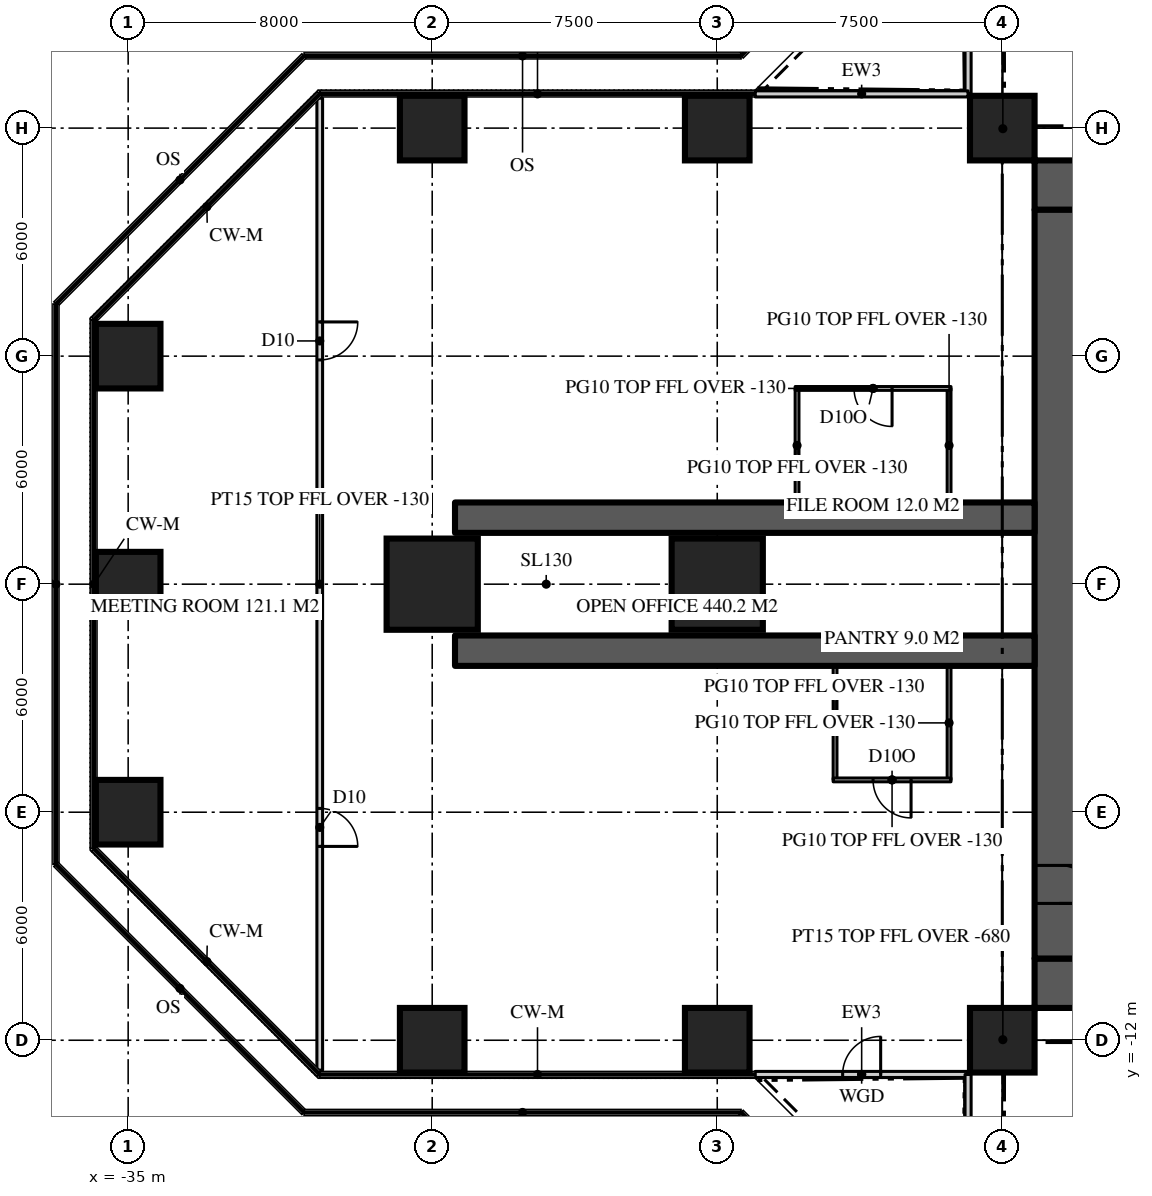
"""IFC4 building model, lengths in metres.
Left out: names, types, materials, properties, quantities, classifications, styles, units other than length and angle.
Written with IfcOpenShell. Run it as: python <this file> out.ifc"""

import sys

from ifc_helpers import new_model, si_unit, direction, frame, frame_2d, origin, origin_2d, place, context, subcontext, project, spatial, rectangle, extrude, element, fill, save


model = new_model("IFC4")
c1 = context("Model", 3, precision=1e-05, world=origin(), true_north=direction((0.0, 1.0)))
c2 = subcontext(c1, "Body", "Model", "MODEL_VIEW")
j1 = project(units=[si_unit("LENGTHUNIT", "METRE"), si_unit("PLANEANGLEUNIT", "RADIAN")], contexts=[c1])
p1 = place(None, origin())
s1 = spatial("IfcSite", under=j1, at=p1, CompositionType="ELEMENT")
p2 = place(p1, origin())
s2 = spatial("IfcBuilding", under=s1, at=p2, CompositionType="ELEMENT")
p3 = place(p2, frame((0.0, 0.0, 128.1)))
s3 = spatial("IfcBuildingStorey", under=s2, at=p3, CompositionType="ELEMENT", Elevation=128.1)
p4 = place(p3, frame((-11.15, 10.5, 0.0), z_axis=(0.0, 0.0, 1.0), x_axis=(1.0, 0.0, 0.0)))
e1 = element("IfcWall", 1, at=p4, inside=s3, PredefinedType="SHEAR", context=c2, shape_type="SweptSolid", body=[
    extrude(rectangle(XDim=22.3, YDim=1.3, at=frame_2d((11.15, 0.0))), origin(), (0.0, 0.0, 1.0), 3.9),
])
p5 = place(p4, frame((4.25, 0.0, 0.0)))
e2 = element("IfcOpeningElement", 2, at=p5, cuts=e1, PredefinedType="OPENING", context=c2, shape_type="SweptSolid", body=[
    extrude(rectangle(XDim=1.8, YDim=2.2, at=frame_2d((0.9, 1.1))), frame((0.0, 0.66, 0.0), z_axis=(0.0, -1.0, 0.0), x_axis=(1.0, 0.0, 0.0)), (0.0, 0.0, 1.0), 1.32),
])
p6 = place(p4, frame((16.25, 0.0, 0.0)))
e3 = element("IfcOpeningElement", 3, at=p6, cuts=e1, PredefinedType="OPENING", context=c2, shape_type="SweptSolid", body=[
    extrude(rectangle(XDim=1.8, YDim=2.2, at=frame_2d((0.9, 1.1))), frame((0.0, 0.66, 0.0), z_axis=(0.0, -1.0, 0.0), x_axis=(1.0, 0.0, 0.0)), (0.0, 0.0, 1.0), 1.32),
])
p7 = place(p3, frame((11.15, -10.5, 0.0), z_axis=(0.0, 0.0, 1.0), x_axis=(-1.0, 0.0, 0.0)))
e4 = element("IfcWall", 4, at=p7, inside=s3, PredefinedType="SHEAR", context=c2, shape_type="SweptSolid", body=[
    extrude(rectangle(XDim=22.3, YDim=1.3, at=frame_2d((11.15, 0.0))), origin(), (0.0, 0.0, 1.0), 3.9),
])
p8 = place(p7, frame((16.25, 0.0, 0.0)))
e5 = element("IfcOpeningElement", 5, at=p8, cuts=e4, PredefinedType="OPENING", context=c2, shape_type="SweptSolid", body=[
    extrude(rectangle(XDim=1.8, YDim=2.2, at=frame_2d((0.9, 1.1))), frame((0.0, 0.66, 0.0), z_axis=(0.0, -1.0, 0.0), x_axis=(1.0, 0.0, 0.0)), (0.0, 0.0, 1.0), 1.32),
])
p9 = place(p7, frame((4.25, 0.0, 0.0)))
e6 = element("IfcOpeningElement", 6, at=p9, cuts=e4, PredefinedType="OPENING", context=c2, shape_type="SweptSolid", body=[
    extrude(rectangle(XDim=1.8, YDim=2.2, at=frame_2d((0.9, 1.1))), frame((0.0, 0.66, 0.0), z_axis=(0.0, -1.0, 0.0), x_axis=(1.0, 0.0, 0.0)), (0.0, 0.0, 1.0), 1.32),
])
p10 = place(p3, frame((-10.5, 9.85, 0.0), z_axis=(0.0, 0.0, 1.0), x_axis=(0.0, -1.0, 0.0)))
e7 = element("IfcWall", 7, at=p10, inside=s3, PredefinedType="SHEAR", context=c2, shape_type="SweptSolid", body=[
    extrude(rectangle(XDim=19.7, YDim=1.3, at=frame_2d((9.85, 0.0))), origin(), (0.0, 0.0, 1.0), 3.9),
])
p11 = place(p10, frame((17.25, 0.0, 0.0)))
e8 = element("IfcOpeningElement", 8, at=p11, cuts=e7, PredefinedType="OPENING", context=c2, shape_type="SweptSolid", body=[
    extrude(rectangle(XDim=1.0, YDim=2.2, at=frame_2d((0.5, 1.1))), frame((0.0, 0.66, 0.0), z_axis=(0.0, -1.0, 0.0), x_axis=(1.0, 0.0, 0.0)), (0.0, 0.0, 1.0), 1.32),
])
for number, where, z_axis, x_axis in (
    (9, (-11.15, 1.75, 0.0), (0.0, 0.0, 1.0), (-1.0, 0.0, 0.0)),
    (10, (-11.15, -1.75, 0.0), (0.0, 0.0, 1.0), (-1.0, 0.0, 0.0)),
):
    element("IfcWall", number, at=place(p3, frame(where, z_axis=z_axis, x_axis=x_axis)), inside=s3, PredefinedType="SHEAR", context=c2, shape_type="SweptSolid", body=[
        extrude(rectangle(XDim=15.25, YDim=0.8, at=frame_2d((7.625, 0.0))), origin(), (0.0, 0.0, 1.0), 3.9),
    ])
for number, where, z_axis, x_axis in (
    (11, (-27.0, -12.0, 0.0), (0.0, 0.0, 1.0), (1.0, 0.0, 0.0)),
    (12, (-19.5, -12.0, 0.0), (0.0, 0.0, 1.0), (1.0, 0.0, 0.0)),
    (13, (-12.0, -12.0, 0.0), (0.0, 0.0, 1.0), (1.0, 0.0, 0.0)),
    (14, (-35.0, -6.0, 0.0), (0.0, 0.0, 1.0), (1.0, 0.0, 0.0)),
    (15, (-35.0, 0.0, 0.0), (0.0, 0.0, 1.0), (1.0, 0.0, 0.0)),
):
    element("IfcColumn", number, at=place(p3, frame(where, z_axis=z_axis, x_axis=x_axis)), inside=s3, PredefinedType="COLUMN", context=c2, shape_type="SweptSolid", body=[
        extrude(rectangle(XDim=1.7, YDim=1.7, at=origin_2d()), origin(), (0.0, 0.0, 1.0), 3.9),
    ])
for number, where, z_axis, x_axis in (
    (16, (-27.0, 0.0, 0.0), (0.0, 0.0, 1.0), (1.0, 0.0, 0.0)),
    (17, (-19.5, 0.0, 0.0), (0.0, 0.0, 1.0), (1.0, 0.0, 0.0)),
):
    element("IfcColumn", number, at=place(p3, frame(where, z_axis=z_axis, x_axis=x_axis)), inside=s3, PredefinedType="COLUMN", context=c2, shape_type="SweptSolid", body=[
        extrude(rectangle(XDim=2.4, YDim=2.4, at=origin_2d()), origin(), (0.0, 0.0, 1.0), 3.9),
    ])
for number, where, z_axis, x_axis in (
    (18, (-35.0, 6.0, 0.0), (0.0, 0.0, 1.0), (1.0, 0.0, 0.0)),
    (19, (-27.0, 12.0, 0.0), (0.0, 0.0, 1.0), (1.0, 0.0, 0.0)),
    (20, (-19.5, 12.0, 0.0), (0.0, 0.0, 1.0), (1.0, 0.0, 0.0)),
    (21, (-12.0, 12.0, 0.0), (0.0, 0.0, 1.0), (1.0, 0.0, 0.0)),
):
    element("IfcColumn", number, at=place(p3, frame(where, z_axis=z_axis, x_axis=x_axis)), inside=s3, PredefinedType="COLUMN", context=c2, shape_type="SweptSolid", body=[
        extrude(rectangle(XDim=1.7, YDim=1.7, at=origin_2d()), origin(), (0.0, 0.0, 1.0), 3.9),
    ])
p12 = place(p3, frame((-12.9, 18.5, 0.0), z_axis=(0.0, 0.0, 1.0), x_axis=(0.0, -1.0, 0.0)))
e22 = element("IfcWall", 22, at=p12, inside=s3, PredefinedType="SOLIDWALL", context=c2, shape_type="SweptSolid", body=[
    extrude(rectangle(XDim=5.6, YDim=0.16, at=frame_2d((2.8, 0.0))), origin(), (0.0, 0.0, 1.0), 3.77),
])
p13 = place(p12, frame((2.3, 0.0, 0.0)))
e23 = element("IfcOpeningElement", 23, at=p13, cuts=e22, PredefinedType="OPENING", context=c2, shape_type="SweptSolid", body=[
    extrude(rectangle(XDim=1.0, YDim=2.2, at=frame_2d((0.5, 1.1))), frame((0.0, 0.09, 0.0), z_axis=(0.0, -1.0, 0.0), x_axis=(1.0, 0.0, 0.0)), (0.0, 0.0, 1.0), 0.18),
])
p14 = place(p3, frame((-12.9, 12.9, 0.0), z_axis=(0.0, 0.0, 1.0), x_axis=(-1.0, 0.0, 0.0)))
e24 = element("IfcWall", 24, at=p14, inside=s3, PredefinedType="SOLIDWALL", context=c2, shape_type="SweptSolid", body=[
    extrude(rectangle(XDim=5.6, YDim=0.16, at=frame_2d((2.8, 0.0))), origin(), (0.0, 0.0, 1.0), 3.77),
])
p15 = place(p3, frame((-18.5, -12.9, 0.0), z_axis=(0.0, 0.0, 1.0), x_axis=(1.0, 0.0, 0.0)))
e25 = element("IfcWall", 25, at=p15, inside=s3, PredefinedType="SOLIDWALL", context=c2, shape_type="SweptSolid", body=[
    extrude(rectangle(XDim=5.6, YDim=0.16, at=frame_2d((2.8, 0.0))), origin(), (0.0, 0.0, 1.0), 3.77),
])
p16 = place(p15, frame((2.3, 0.0, 0.0)))
e26 = element("IfcOpeningElement", 26, at=p16, cuts=e25, PredefinedType="OPENING", context=c2, shape_type="SweptSolid", body=[
    extrude(rectangle(XDim=1.0, YDim=2.2, at=frame_2d((0.5, 1.1))), frame((0.0, 0.09, 0.0), z_axis=(0.0, -1.0, 0.0), x_axis=(1.0, 0.0, 0.0)), (0.0, 0.0, 1.0), 0.18),
])
p17 = place(p3, frame((-12.9, -12.9, 0.0), z_axis=(0.0, 0.0, 1.0), x_axis=(0.0, -1.0, 0.0)))
e27 = element("IfcWall", 27, at=p17, inside=s3, PredefinedType="SOLIDWALL", context=c2, shape_type="SweptSolid", body=[
    extrude(rectangle(XDim=5.6, YDim=0.16, at=frame_2d((2.8, 0.0))), origin(), (0.0, 0.0, 1.0), 3.77),
])
p18 = place(p3, frame((-29.959, 12.786, 0.0), z_axis=(0.0, 0.0, 1.0), x_axis=(0.0, -1.0, 0.0)))
e28 = element("IfcWall", 28, at=p18, inside=s3, PredefinedType="PARTITIONING", context=c2, shape_type="SweptSolid", body=[
    extrude(rectangle(XDim=25.573, YDim=0.15, at=frame_2d((12.786, 0.0))), origin(), (0.0, 0.0, 1.0), 3.77),
])
p19 = place(p18, frame((18.687, 0.0, 0.0)))
e29 = element("IfcOpeningElement", 29, at=p19, cuts=e28, PredefinedType="OPENING", context=c2, shape_type="SweptSolid", body=[
    extrude(rectangle(XDim=1.0, YDim=2.2, at=frame_2d((0.5, 1.1))), frame((0.0, 0.085, 0.0), z_axis=(0.0, -1.0, 0.0), x_axis=(1.0, 0.0, 0.0)), (0.0, 0.0, 1.0), 0.17),
])
p20 = place(p18, frame((5.886, 0.0, 0.0)))
e30 = element("IfcOpeningElement", 30, at=p20, cuts=e28, PredefinedType="OPENING", context=c2, shape_type="SweptSolid", body=[
    extrude(rectangle(XDim=1.0, YDim=2.2, at=frame_2d((0.5, 1.1))), frame((0.0, 0.085, 0.0), z_axis=(0.0, -1.0, 0.0), x_axis=(1.0, 0.0, 0.0)), (0.0, 0.0, 1.0), 0.17),
])
for number, where, z_axis, x_axis in (
    (31, (-13.4, -2.15, 0.0), (0.0, 0.0, 1.0), (0.0, -1.0, 0.0)),
    (32, (-16.4, -2.15, 0.0), (0.0, 0.0, 1.0), (0.0, -1.0, 0.0)),
):
    element("IfcWall", number, at=place(p3, frame(where, z_axis=z_axis, x_axis=x_axis)), inside=s3, PredefinedType="PARTITIONING", context=c2, shape_type="SweptSolid", body=[
        extrude(rectangle(XDim=3.0, YDim=0.1, at=frame_2d((1.5, 0.0))), origin(), (0.0, 0.0, 1.0), 3.77),
    ])
p21 = place(p3, frame((-13.35, -5.15, 0.0), z_axis=(0.0, 0.0, 1.0), x_axis=(-1.0, 0.0, 0.0)))
e33 = element("IfcWall", 33, at=p21, inside=s3, PredefinedType="PARTITIONING", context=c2, shape_type="SweptSolid", body=[
    extrude(rectangle(XDim=3.1, YDim=0.1, at=frame_2d((1.55, 0.0))), origin(), (0.0, 0.0, 1.0), 3.77),
])
p22 = place(p21, frame((1.05, 0.0, 0.0)))
e34 = element("IfcOpeningElement", 34, at=p22, cuts=e33, PredefinedType="OPENING", context=c2, shape_type="SweptSolid", body=[
    extrude(rectangle(XDim=1.0, YDim=2.2, at=frame_2d((0.5, 1.1))), frame((0.0, 0.06, 0.0), z_axis=(0.0, -1.0, 0.0), x_axis=(1.0, 0.0, 0.0)), (0.0, 0.0, 1.0), 0.12),
])
for number, where, z_axis, x_axis in (
    (35, (-13.4, 2.15, 0.0), (0.0, 0.0, 1.0), (0.0, 1.0, 0.0)),
    (36, (-17.4, 2.15, 0.0), (0.0, 0.0, 1.0), (0.0, 1.0, 0.0)),
):
    element("IfcWall", number, at=place(p3, frame(where, z_axis=z_axis, x_axis=x_axis)), inside=s3, PredefinedType="PARTITIONING", context=c2, shape_type="SweptSolid", body=[
        extrude(rectangle(XDim=3.0, YDim=0.1, at=frame_2d((1.5, 0.0))), origin(), (0.0, 0.0, 1.0), 3.77),
    ])
p23 = place(p3, frame((-13.35, 5.15, 0.0), z_axis=(0.0, 0.0, 1.0), x_axis=(-1.0, 0.0, 0.0)))
e37 = element("IfcWall", 37, at=p23, inside=s3, PredefinedType="PARTITIONING", context=c2, shape_type="SweptSolid", body=[
    extrude(rectangle(XDim=4.1, YDim=0.1, at=frame_2d((2.05, 0.0))), origin(), (0.0, 0.0, 1.0), 3.77),
])
p24 = place(p23, frame((1.55, 0.0, 0.0)))
e38 = element("IfcOpeningElement", 38, at=p24, cuts=e37, PredefinedType="OPENING", context=c2, shape_type="SweptSolid", body=[
    extrude(rectangle(XDim=1.0, YDim=2.2, at=frame_2d((0.5, 1.1))), frame((0.0, 0.06, 0.0), z_axis=(0.0, -1.0, 0.0), x_axis=(1.0, 0.0, 0.0)), (0.0, 0.0, 1.0), 0.12),
])
for number, where, z_axis, x_axis in (
    (39, (-11.15, 11.15, 0.0), (0.0, 0.0, 1.0), (-0.707, 0.707, 0.0)),
    (40, (-11.15, -11.15, 0.0), (0.0, 0.0, 1.0), (-0.707, -0.707, 0.0)),
):
    element("IfcWall", number, at=place(p3, frame(where, z_axis=z_axis, x_axis=x_axis)), inside=s3, PredefinedType="PARTITIONING", context=c2, shape_type="SweptSolid", body=[
        extrude(rectangle(XDim=2.362, YDim=0.15, at=frame_2d((1.181, 0.0))), origin(), (0.0, 0.0, 1.0), 3.22),
    ])
p25 = place(p16, origin())
e41 = element("IfcDoor", 41, at=p25, inside=s3, OperationType="SINGLE_SWING_RIGHT", PredefinedType="DOOR", context=c2, shape_type="SweptSolid", body=[
    extrude(rectangle(XDim=1.0, YDim=2.2, at=frame_2d((0.5, 1.1))), frame((0.0, 0.025, 0.0), z_axis=(0.0, -1.0, 0.0), x_axis=(1.0, 0.0, 0.0)), (0.0, 0.0, 1.0), 0.05),
])
fill(e26, e41)
p26 = place(p11, origin())
e42 = element("IfcDoor", 42, at=p26, inside=s3, OperationType="SINGLE_SWING_RIGHT", PredefinedType="DOOR", context=c2, shape_type="SweptSolid", body=[
    extrude(rectangle(XDim=1.0, YDim=2.2, at=frame_2d((0.5, 1.1))), frame((0.0, 0.025, 0.0), z_axis=(0.0, -1.0, 0.0), x_axis=(1.0, 0.0, 0.0)), (0.0, 0.0, 1.0), 0.05),
])
fill(e8, e42)
p27 = place(p19, origin())
e43 = element("IfcDoor", 43, at=p27, inside=s3, OperationType="SINGLE_SWING_RIGHT", PredefinedType="DOOR", context=c2, shape_type="SweptSolid", body=[
    extrude(rectangle(XDim=1.0, YDim=2.2, at=frame_2d((0.5, 1.1))), frame((0.0, 0.025, 0.0), z_axis=(0.0, -1.0, 0.0), x_axis=(1.0, 0.0, 0.0)), (0.0, 0.0, 1.0), 0.05),
])
fill(e29, e43)
p28 = place(p20, origin())
e44 = element("IfcDoor", 44, at=p28, inside=s3, OperationType="SINGLE_SWING_LEFT", PredefinedType="DOOR", context=c2, shape_type="SweptSolid", body=[
    extrude(rectangle(XDim=1.0, YDim=2.2, at=frame_2d((0.5, 1.1))), frame((0.0, 0.025, 0.0), z_axis=(0.0, -1.0, 0.0), x_axis=(1.0, 0.0, 0.0)), (0.0, 0.0, 1.0), 0.05),
])
fill(e30, e44)
p29 = place(p22, origin())
e45 = element("IfcDoor", 45, at=p29, inside=s3, OperationType="SINGLE_SWING_LEFT", PredefinedType="DOOR", context=c2, shape_type="SweptSolid", body=[
    extrude(rectangle(XDim=1.0, YDim=2.2, at=frame_2d((0.5, 1.1))), frame((0.0, 0.025, 0.0), z_axis=(0.0, -1.0, 0.0), x_axis=(1.0, 0.0, 0.0)), (0.0, 0.0, 1.0), 0.05),
])
fill(e34, e45)
p30 = place(p24, origin())
e46 = element("IfcDoor", 46, at=p30, inside=s3, OperationType="SINGLE_SWING_LEFT", PredefinedType="DOOR", context=c2, shape_type="SweptSolid", body=[
    extrude(rectangle(XDim=1.0, YDim=2.2, at=frame_2d((0.5, 1.1))), frame((0.0, 0.025, 0.0), z_axis=(0.0, -1.0, 0.0), x_axis=(1.0, 0.0, 0.0)), (0.0, 0.0, 1.0), 0.05),
])
fill(e38, e46)
save(model, sys.argv[1])
